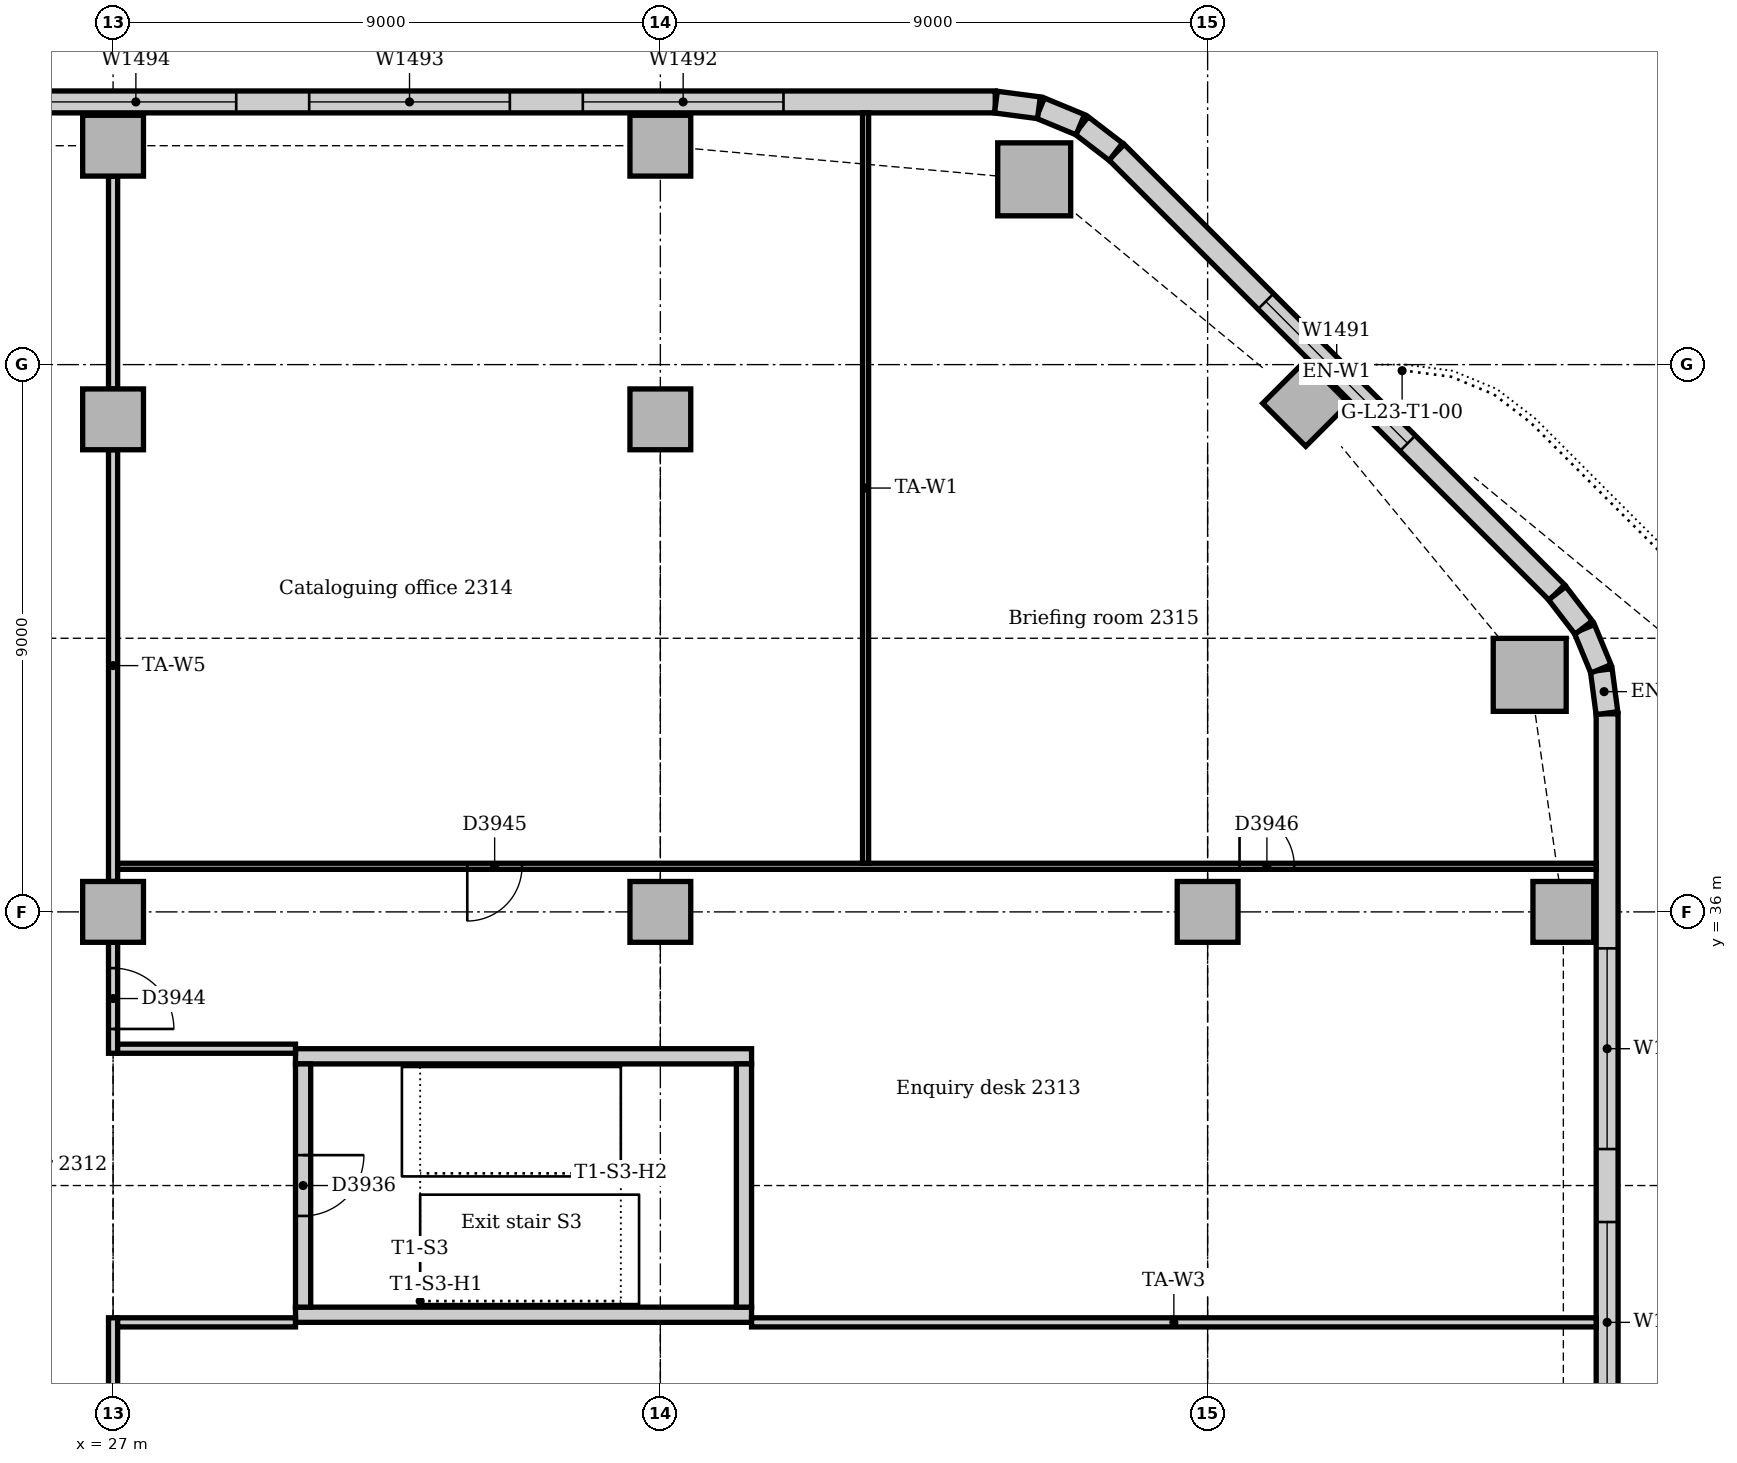
"""IFC4 building model, lengths in metres.
Left out: names, types, materials, properties, quantities, classifications, styles, units other than length and angle.
Written with IfcOpenShell. Run it as: python <this file> out.ifc"""

import sys

from ifc_helpers import new_model, si_unit, direction, frame, frame_2d, origin, origin_2d, place, context, subcontext, project, spatial, rectangle, extrude, element, fill, save


model = new_model("IFC4")
c1 = context("Model", 3, precision=1e-05, world=origin(), true_north=direction((0.0, 1.0)))
c2 = subcontext(c1, "Body", "Model", "MODEL_VIEW")
j1 = project(units=[si_unit("LENGTHUNIT", "METRE"), si_unit("PLANEANGLEUNIT", "RADIAN")], contexts=[c1])
p1 = place(None, origin())
s1 = spatial("IfcSite", under=j1, at=p1, CompositionType="ELEMENT")
p2 = place(p1, origin())
s2 = spatial("IfcBuilding", under=s1, at=p2, CompositionType="ELEMENT")
p3 = place(p2, frame((0.0, 0.0, 100.0)))
s3 = spatial("IfcBuildingStorey", under=s2, at=p3, CompositionType="ELEMENT", Elevation=100.0)
for number, where, z_axis, x_axis in (
    (1, (30.0, 29.375, 0.0), (0.0, 0.0, 1.0), (1.0, 0.0, 0.0)),
    (2, (37.5, 33.625, 0.0), (0.0, 0.0, 1.0), (-1.0, 0.0, 0.0)),
):
    element("IfcWall", number, at=place(p3, frame(where, z_axis=z_axis, x_axis=x_axis)), inside=s3, PredefinedType="SOLIDWALL", context=c2, shape_type="SweptSolid", body=[
        extrude(rectangle(XDim=7.5, YDim=0.25, at=frame_2d((3.75, 0.0))), origin(), (0.0, 0.0, 1.0), 4.0),
    ])
p4 = place(p3, frame((37.375, 29.5, 0.0), z_axis=(0.0, 0.0, 1.0), x_axis=(0.0, 1.0, 0.0)))
e3 = element("IfcWall", 3, at=p4, inside=s3, PredefinedType="SOLIDWALL", context=c2, shape_type="SweptSolid", body=[
    extrude(rectangle(XDim=4.0, YDim=0.25, at=frame_2d((2.0, 0.0))), origin(), (0.0, 0.0, 1.0), 4.0),
])
p5 = place(p3, frame((30.125, 33.5, 0.0), z_axis=(0.0, 0.0, 1.0), x_axis=(0.0, -1.0, 0.0)))
e4 = element("IfcWall", 4, at=p5, inside=s3, PredefinedType="SOLIDWALL", context=c2, shape_type="SweptSolid", body=[
    extrude(rectangle(XDim=4.0, YDim=0.25, at=frame_2d((2.0, 0.0))), origin(), (0.0, 0.0, 1.0), 4.0),
])
p6 = place(p5, frame((1.5, 0.0, 0.0)))
e5 = element("IfcOpeningElement", 5, at=p6, cuts=e4, PredefinedType="OPENING", context=c2, shape_type="SweptSolid", body=[
    extrude(rectangle(XDim=1.0, YDim=2.1, at=frame_2d((0.5, 1.05))), frame((0.0, 0.135, 0.0), z_axis=(0.0, -1.0, 0.0), x_axis=(1.0, 0.0, 0.0)), (0.0, 0.0, 1.0), 0.27),
])
for number, where, z_axis, x_axis in (
    (6, (50.297, 39.898, -0.15), (0.0, 0.0, 1.0), (1.0, 0.0, 0.0)),
    (7, (42.148, 48.047, -0.15), (0.0, 0.0, 1.0), (1.0, 0.0, 0.0)),
):
    element("IfcColumn", number, at=place(p3, frame(where, z_axis=z_axis, x_axis=x_axis)), inside=s3, PredefinedType="COLUMN", context=c2, shape_type="SweptSolid", body=[
        extrude(rectangle(XDim=1.2, YDim=1.2, at=origin_2d()), origin(), (0.0, 0.0, 1.0), 4.0),
    ])
for number, where, z_axis, x_axis in (
    (8, (50.85, 36.0, -0.15), (0.0, 0.0, 1.0), (1.0, 0.0, 0.0)),
    (9, (46.614, 44.364, -0.15), (0.0, 0.0, 1.0), (0.707, 0.707, 0.0)),
    (10, (27.0, 48.6, -0.15), (0.0, 0.0, 1.0), (1.0, 0.0, 0.0)),
    (11, (36.0, 48.6, -0.15), (0.0, 0.0, 1.0), (1.0, 0.0, 0.0)),
):
    element("IfcColumn", number, at=place(p3, frame(where, z_axis=z_axis, x_axis=x_axis)), inside=s3, PredefinedType="COLUMN", context=c2, shape_type="SweptSolid", body=[
        extrude(rectangle(XDim=1.0, YDim=1.0, at=origin_2d()), origin(), (0.0, 0.0, 1.0), 4.0),
    ])
for number, where, z_axis, x_axis in (
    (12, (27.0, 36.0, 0.0), (0.0, 0.0, 1.0), (1.0, 0.0, 0.0)),
    (13, (27.0, 44.1, 0.0), (0.0, 0.0, 1.0), (1.0, 0.0, 0.0)),
    (14, (36.0, 36.0, 0.0), (0.0, 0.0, 1.0), (1.0, 0.0, 0.0)),
    (15, (36.0, 44.1, 0.0), (0.0, 0.0, 1.0), (1.0, 0.0, 0.0)),
    (16, (45.0, 36.0, 0.0), (0.0, 0.0, 1.0), (1.0, 0.0, 0.0)),
):
    element("IfcColumn", number, at=place(p3, frame(where, z_axis=z_axis, x_axis=x_axis)), inside=s3, PredefinedType="COLUMN", context=c2, shape_type="SweptSolid", body=[
        extrude(rectangle(XDim=1.0, YDim=1.0, at=origin_2d()), origin(), (0.0, 0.0, 1.0), 3.85),
    ])
p7 = place(p3, frame((51.57, 14.743, 0.0), z_axis=(0.0, 0.0, 1.0), x_axis=(0.0, 1.0, 0.0)))
e17 = element("IfcWall", 17, at=p7, inside=s3, PredefinedType="STANDARD", context=c2, shape_type="SweptSolid", body=[
    extrude(rectangle(XDim=24.515, YDim=0.36, at=frame_2d((12.257, 0.0))), origin(), (0.0, 0.0, 1.0), 3.85),
])
p8 = place(p7, frame((4.157, 0.0, 0.0)))
e18 = element("IfcOpeningElement", 18, at=p8, cuts=e17, PredefinedType="OPENING", context=c2, shape_type="SweptSolid", body=[
    extrude(rectangle(XDim=1.8, YDim=2.4, at=frame_2d((0.9, 1.2))), frame((0.0, 0.19, 0.0), z_axis=(0.0, -1.0, 0.0), x_axis=(1.0, 0.0, 0.0)), (0.0, 0.0, 1.0), 0.38),
])
p9 = place(p7, frame((8.357, 0.0, 0.9)))
e19 = element("IfcOpeningElement", 19, at=p9, cuts=e17, PredefinedType="OPENING", context=c2, shape_type="SweptSolid", body=[
    extrude(rectangle(XDim=3.3, YDim=1.6, at=frame_2d((1.65, 0.8))), frame((0.0, 0.19, 0.0), z_axis=(0.0, -1.0, 0.0), x_axis=(1.0, 0.0, 0.0)), (0.0, 0.0, 1.0), 0.38),
])
p10 = place(p7, frame((12.857, 0.0, 0.9)))
e20 = element("IfcOpeningElement", 20, at=p10, cuts=e17, PredefinedType="OPENING", context=c2, shape_type="SweptSolid", body=[
    extrude(rectangle(XDim=3.3, YDim=1.6, at=frame_2d((1.65, 0.8))), frame((0.0, 0.19, 0.0), z_axis=(0.0, -1.0, 0.0), x_axis=(1.0, 0.0, 0.0)), (0.0, 0.0, 1.0), 0.38),
])
p11 = place(p7, frame((17.357, 0.0, 0.9)))
e21 = element("IfcOpeningElement", 21, at=p11, cuts=e17, PredefinedType="OPENING", context=c2, shape_type="SweptSolid", body=[
    extrude(rectangle(XDim=3.3, YDim=1.6, at=frame_2d((1.65, 0.8))), frame((0.0, 0.19, 0.0), z_axis=(0.0, -1.0, 0.0), x_axis=(1.0, 0.0, 0.0)), (0.0, 0.0, 1.0), 0.38),
])
p12 = place(p3, frame((50.744, 41.251, 0.0), z_axis=(0.0, 0.0, 1.0), x_axis=(-0.707106781187, 0.707106781187, 0.0)))
e22 = element("IfcWall", 22, at=p12, inside=s3, PredefinedType="STANDARD", context=c2, shape_type="SweptSolid", body=[
    extrude(rectangle(XDim=10.243, YDim=0.36, at=frame_2d((5.121, 0.0))), origin(), (0.0, 0.0, 1.0), 3.85),
])
p13 = place(p12, frame((3.471, 0.0, 0.9)))
e23 = element("IfcOpeningElement", 23, at=p13, cuts=e22, PredefinedType="OPENING", context=c2, shape_type="SweptSolid", body=[
    extrude(rectangle(XDim=3.3, YDim=1.6, at=frame_2d((1.65, 0.8))), frame((0.0, 0.19, 0.0), z_axis=(0.0, -1.0, 0.0), x_axis=(1.0, 0.0, 0.0)), (0.0, 0.0, 1.0), 0.38),
])
p14 = place(p3, frame((41.507, 49.32, 0.0), z_axis=(0.0, 0.0, 1.0), x_axis=(-1.0, 0.0, 0.0)))
e24 = element("IfcWall", 24, at=p14, inside=s3, PredefinedType="STANDARD", context=c2, shape_type="SweptSolid", body=[
    extrude(rectangle(XDim=37.265, YDim=0.36, at=frame_2d((18.632, 0.0))), origin(), (0.0, 0.0, 1.0), 3.85),
])
p15 = place(p14, frame((3.482, 0.0, 0.9)))
e25 = element("IfcOpeningElement", 25, at=p15, cuts=e24, PredefinedType="OPENING", context=c2, shape_type="SweptSolid", body=[
    extrude(rectangle(XDim=3.3, YDim=1.6, at=frame_2d((1.65, 0.8))), frame((0.0, 0.19, 0.0), z_axis=(0.0, -1.0, 0.0), x_axis=(1.0, 0.0, 0.0)), (0.0, 0.0, 1.0), 0.38),
])
p16 = place(p14, frame((7.982, 0.0, 0.9)))
e26 = element("IfcOpeningElement", 26, at=p16, cuts=e24, PredefinedType="OPENING", context=c2, shape_type="SweptSolid", body=[
    extrude(rectangle(XDim=3.3, YDim=1.6, at=frame_2d((1.65, 0.8))), frame((0.0, 0.19, 0.0), z_axis=(0.0, -1.0, 0.0), x_axis=(1.0, 0.0, 0.0)), (0.0, 0.0, 1.0), 0.38),
])
p17 = place(p14, frame((12.482, 0.0, 0.9)))
e27 = element("IfcOpeningElement", 27, at=p17, cuts=e24, PredefinedType="OPENING", context=c2, shape_type="SweptSolid", body=[
    extrude(rectangle(XDim=3.3, YDim=1.6, at=frame_2d((1.65, 0.8))), frame((0.0, 0.19, 0.0), z_axis=(0.0, -1.0, 0.0), x_axis=(1.0, 0.0, 0.0)), (0.0, 0.0, 1.0), 0.38),
])
p18 = place(p14, frame((17.032, 0.0, 0.9)))
e28 = element("IfcOpeningElement", 28, at=p18, cuts=e24, PredefinedType="OPENING", context=c2, shape_type="SweptSolid", body=[
    extrude(rectangle(XDim=1.8, YDim=1.6, at=frame_2d((0.9, 0.8))), frame((0.0, 0.19, 0.0), z_axis=(0.0, -1.0, 0.0), x_axis=(1.0, 0.0, 0.0)), (0.0, 0.0, 1.0), 0.38),
])
p19 = place(p14, frame((21.482, 0.0, 0.9)))
e29 = element("IfcOpeningElement", 29, at=p19, cuts=e24, PredefinedType="OPENING", context=c2, shape_type="SweptSolid", body=[
    extrude(rectangle(XDim=3.3, YDim=1.6, at=frame_2d((1.65, 0.8))), frame((0.0, 0.19, 0.0), z_axis=(0.0, -1.0, 0.0), x_axis=(1.0, 0.0, 0.0)), (0.0, 0.0, 1.0), 0.38),
])
p20 = place(p14, frame((25.982, 0.0, 0.9)))
e30 = element("IfcOpeningElement", 30, at=p20, cuts=e24, PredefinedType="OPENING", context=c2, shape_type="SweptSolid", body=[
    extrude(rectangle(XDim=3.3, YDim=1.6, at=frame_2d((1.65, 0.8))), frame((0.0, 0.19, 0.0), z_axis=(0.0, -1.0, 0.0), x_axis=(1.0, 0.0, 0.0)), (0.0, 0.0, 1.0), 0.38),
])
p21 = place(p14, frame((30.482, 0.0, 0.9)))
e31 = element("IfcOpeningElement", 31, at=p21, cuts=e24, PredefinedType="OPENING", context=c2, shape_type="SweptSolid", body=[
    extrude(rectangle(XDim=3.3, YDim=1.6, at=frame_2d((1.65, 0.8))), frame((0.0, 0.19, 0.0), z_axis=(0.0, -1.0, 0.0), x_axis=(1.0, 0.0, 0.0)), (0.0, 0.0, 1.0), 0.38),
])
for number, where, z_axis, x_axis in (
    (32, (51.567, 39.269, 0.0), (0.0, 0.0, 1.0), (-0.131, 0.991, 0.0)),
    (33, (51.468, 39.997, 0.0), (0.0, 0.0, 1.0), (-0.383, 0.924, 0.0)),
):
    element("IfcWall", number, at=place(p3, frame(where, z_axis=z_axis, x_axis=x_axis)), inside=s3, PredefinedType="STANDARD", context=c2, shape_type="SweptSolid", body=[
        extrude(rectangle(XDim=0.713, YDim=0.36, at=frame_2d((0.356, 0.0))), origin(), (0.0, 0.0, 1.0), 3.85),
    ])
for number, where, z_axis, x_axis in (
    (34, (51.184, 40.675, 0.0), (0.0, 0.0, 1.0), (-0.609, 0.793, 0.0)),
    (35, (43.491, 48.5, 0.0), (0.0, 0.0, 1.0), (-0.793, 0.609, 0.0)),
):
    element("IfcWall", number, at=place(p3, frame(where, z_axis=z_axis, x_axis=x_axis)), inside=s3, PredefinedType="STANDARD", context=c2, shape_type="SweptSolid", body=[
        extrude(rectangle(XDim=0.713, YDim=0.36, at=frame_2d((0.357, 0.0))), origin(), (0.0, 0.0, 1.0), 3.85),
    ])
for number, where, z_axis, x_axis in (
    (36, (42.906, 48.945, 0.0), (0.0, 0.0, 1.0), (-0.924, 0.383, 0.0)),
    (37, (42.226, 49.224, 0.0), (0.0, 0.0, 1.0), (-0.991, 0.131, 0.0)),
):
    element("IfcWall", number, at=place(p3, frame(where, z_axis=z_axis, x_axis=x_axis)), inside=s3, PredefinedType="STANDARD", context=c2, shape_type="SweptSolid", body=[
        extrude(rectangle(XDim=0.713, YDim=0.36, at=frame_2d((0.356, 0.0))), origin(), (0.0, 0.0, 1.0), 3.85),
    ])
p22 = place(p3, frame((27.0, 33.675, 0.0), z_axis=(0.0, 0.0, 1.0), x_axis=(0.0, 1.0, 0.0)))
e38 = element("IfcWall", 38, at=p22, inside=s3, PredefinedType="PARTITIONING", context=c2, shape_type="SweptSolid", body=[
    extrude(rectangle(XDim=1.825, YDim=0.15, at=frame_2d((0.912, 0.0))), origin(), (0.0, 0.0, 1.0), 3.256),
])
p23 = place(p22, frame((0.4, 0.0, 0.0)))
e39 = element("IfcOpeningElement", 39, at=p23, cuts=e38, PredefinedType="OPENING", context=c2, shape_type="SweptSolid", body=[
    extrude(rectangle(XDim=1.0, YDim=2.1, at=frame_2d((0.5, 1.05))), frame((0.0, 0.085, 0.0), z_axis=(0.0, -1.0, 0.0), x_axis=(1.0, 0.0, 0.0)), (0.0, 0.0, 1.0), 0.17),
])
p24 = place(p3, frame((27.0, 36.5, 0.0), z_axis=(0.0, 0.0, 1.0), x_axis=(0.0, 1.0, 0.0)))
e40 = element("IfcWall", 40, at=p24, inside=s3, PredefinedType="PARTITIONING", context=c2, shape_type="SweptSolid", body=[
    extrude(rectangle(XDim=7.1, YDim=0.15, at=frame_2d((3.55, 0.0))), origin(), (0.0, 0.0, 1.0), 3.256),
])
p25 = place(p3, frame((27.0, 44.6, 0.0), z_axis=(0.0, 0.0, 1.0), x_axis=(0.0, 1.0, 0.0)))
e41 = element("IfcWall", 41, at=p25, inside=s3, PredefinedType="PARTITIONING", context=c2, shape_type="SweptSolid", body=[
    extrude(rectangle(XDim=3.5, YDim=0.15, at=frame_2d((1.75, 0.0))), origin(), (0.0, 0.0, 1.0), 3.652),
])
p26 = place(p3, frame((27.0, 27.5, 0.0), z_axis=(0.0, 0.0, 1.0), x_axis=(0.0, 1.0, 0.0)))
e42 = element("IfcWall", 42, at=p26, inside=s3, PredefinedType="PARTITIONING", context=c2, shape_type="SweptSolid", body=[
    extrude(rectangle(XDim=1.825, YDim=0.15, at=frame_2d((0.912, 0.0))), origin(), (0.0, 0.0, 1.0), 3.256),
])
for number, where, z_axis, x_axis in (
    (43, (27.075, 29.25, 0.0), (0.0, 0.0, 1.0), (1.0, 0.0, 0.0)),
    (44, (27.075, 33.75, 0.0), (0.0, 0.0, 1.0), (1.0, 0.0, 0.0)),
):
    element("IfcWall", number, at=place(p3, frame(where, z_axis=z_axis, x_axis=x_axis)), inside=s3, PredefinedType="PARTITIONING", context=c2, shape_type="SweptSolid", body=[
        extrude(rectangle(XDim=2.925, YDim=0.15, at=frame_2d((1.462, 0.0))), origin(), (0.0, 0.0, 1.0), 3.85),
    ])
p27 = place(p3, frame((37.5, 29.25, 0.0), z_axis=(0.0, 0.0, 1.0), x_axis=(1.0, 0.0, 0.0)))
e45 = element("IfcWall", 45, at=p27, inside=s3, PredefinedType="PARTITIONING", context=c2, shape_type="SweptSolid", body=[
    extrude(rectangle(XDim=13.89, YDim=0.15, at=frame_2d((6.945, 0.0))), origin(), (0.0, 0.0, 1.0), 3.85),
])
p28 = place(p3, frame((27.075, 36.75, 0.0), z_axis=(0.0, 0.0, 1.0), x_axis=(1.0, 0.0, 0.0)))
e46 = element("IfcWall", 46, at=p28, inside=s3, PredefinedType="PARTITIONING", context=c2, shape_type="SweptSolid", body=[
    extrude(rectangle(XDim=24.315, YDim=0.1, at=frame_2d((12.158, 0.0))), origin(), (0.0, 0.0, 1.0), 3.85),
])
p29 = place(p28, frame((5.75, 0.0, 0.0)))
e47 = element("IfcOpeningElement", 47, at=p29, cuts=e46, PredefinedType="OPENING", context=c2, shape_type="SweptSolid", body=[
    extrude(rectangle(XDim=0.9, YDim=2.1, at=frame_2d((0.45, 1.05))), frame((0.0, 0.06, 0.0), z_axis=(0.0, -1.0, 0.0), x_axis=(1.0, 0.0, 0.0)), (0.0, 0.0, 1.0), 0.12),
])
p30 = place(p28, frame((18.45, 0.0, 0.0)))
e48 = element("IfcOpeningElement", 48, at=p30, cuts=e46, PredefinedType="OPENING", context=c2, shape_type="SweptSolid", body=[
    extrude(rectangle(XDim=0.9, YDim=2.1, at=frame_2d((0.45, 1.05))), frame((0.0, 0.06, 0.0), z_axis=(0.0, -1.0, 0.0), x_axis=(1.0, 0.0, 0.0)), (0.0, 0.0, 1.0), 0.12),
])
p31 = place(p3, frame((39.375, 36.8, 0.0), z_axis=(0.0, 0.0, 1.0), x_axis=(0.0, 1.0, 0.0)))
e49 = element("IfcWall", 49, at=p31, inside=s3, PredefinedType="PARTITIONING", context=c2, shape_type="SweptSolid", body=[
    extrude(rectangle(XDim=12.34, YDim=0.1, at=frame_2d((6.17, 0.0))), origin(), (0.0, 0.0, 1.0), 3.85),
])
p32 = place(p10, origin())
e50 = element("IfcWindow", 50, at=p32, inside=s3, PartitioningType="SINGLE_PANEL", PredefinedType="WINDOW", context=c2, shape_type="SweptSolid", body=[
    extrude(rectangle(XDim=3.3, YDim=1.6, at=frame_2d((1.65, 0.8))), frame((0.0, 0.13, 0.0), z_axis=(0.0, -1.0, 0.0), x_axis=(1.0, 0.0, 0.0)), (0.0, 0.0, 1.0), 0.06),
])
fill(e20, e50)
p33 = place(p11, origin())
e51 = element("IfcWindow", 51, at=p33, inside=s3, PartitioningType="SINGLE_PANEL", PredefinedType="WINDOW", context=c2, shape_type="SweptSolid", body=[
    extrude(rectangle(XDim=3.3, YDim=1.6, at=frame_2d((1.65, 0.8))), frame((0.0, 0.13, 0.0), z_axis=(0.0, -1.0, 0.0), x_axis=(1.0, 0.0, 0.0)), (0.0, 0.0, 1.0), 0.06),
])
fill(e21, e51)
p34 = place(p13, origin())
e52 = element("IfcWindow", 52, at=p34, inside=s3, PartitioningType="SINGLE_PANEL", PredefinedType="WINDOW", context=c2, shape_type="SweptSolid", body=[
    extrude(rectangle(XDim=3.3, YDim=1.6, at=frame_2d((1.65, 0.8))), frame((0.0, 0.13, 0.0), z_axis=(0.0, -1.0, 0.0), x_axis=(1.0, 0.0, 0.0)), (0.0, 0.0, 1.0), 0.06),
])
fill(e23, e52)
p35 = place(p15, origin())
e53 = element("IfcWindow", 53, at=p35, inside=s3, PartitioningType="SINGLE_PANEL", PredefinedType="WINDOW", context=c2, shape_type="SweptSolid", body=[
    extrude(rectangle(XDim=3.3, YDim=1.6, at=frame_2d((1.65, 0.8))), frame((0.0, 0.13, 0.0), z_axis=(0.0, -1.0, 0.0), x_axis=(1.0, 0.0, 0.0)), (0.0, 0.0, 1.0), 0.06),
])
fill(e25, e53)
p36 = place(p16, origin())
e54 = element("IfcWindow", 54, at=p36, inside=s3, PartitioningType="SINGLE_PANEL", PredefinedType="WINDOW", context=c2, shape_type="SweptSolid", body=[
    extrude(rectangle(XDim=3.3, YDim=1.6, at=frame_2d((1.65, 0.8))), frame((0.0, 0.13, 0.0), z_axis=(0.0, -1.0, 0.0), x_axis=(1.0, 0.0, 0.0)), (0.0, 0.0, 1.0), 0.06),
])
fill(e26, e54)
p37 = place(p17, origin())
e55 = element("IfcWindow", 55, at=p37, inside=s3, PartitioningType="SINGLE_PANEL", PredefinedType="WINDOW", context=c2, shape_type="SweptSolid", body=[
    extrude(rectangle(XDim=3.3, YDim=1.6, at=frame_2d((1.65, 0.8))), frame((0.0, 0.13, 0.0), z_axis=(0.0, -1.0, 0.0), x_axis=(1.0, 0.0, 0.0)), (0.0, 0.0, 1.0), 0.06),
])
fill(e27, e55)
p38 = place(p6, origin())
e56 = element("IfcDoor", 56, at=p38, inside=s3, OperationType="SINGLE_SWING_LEFT", PredefinedType="DOOR", context=c2, shape_type="SweptSolid", body=[
    extrude(rectangle(XDim=1.0, YDim=2.1, at=frame_2d((0.5, 1.05))), frame((0.0, 0.025, 0.0), z_axis=(0.0, -1.0, 0.0), x_axis=(1.0, 0.0, 0.0)), (0.0, 0.0, 1.0), 0.05),
])
fill(e5, e56)
p39 = place(p23, frame((1.0, 0.0, 0.0), z_axis=(0.0, 0.0, 1.0), x_axis=(-1.0, 0.0, 0.0)))
e57 = element("IfcDoor", 57, at=p39, inside=s3, OperationType="SINGLE_SWING_RIGHT", PredefinedType="DOOR", context=c2, shape_type="SweptSolid", body=[
    extrude(rectangle(XDim=1.0, YDim=2.1, at=frame_2d((0.5, 1.05))), frame((0.0, 0.025, 0.0), z_axis=(0.0, -1.0, 0.0), x_axis=(1.0, 0.0, 0.0)), (0.0, 0.0, 1.0), 0.05),
])
fill(e39, e57)
p40 = place(p29, frame((0.9, 0.0, 0.0), z_axis=(0.0, 0.0, 1.0), x_axis=(-1.0, 0.0, 0.0)))
e58 = element("IfcDoor", 58, at=p40, inside=s3, OperationType="SINGLE_SWING_RIGHT", PredefinedType="DOOR", context=c2, shape_type="SweptSolid", body=[
    extrude(rectangle(XDim=0.9, YDim=2.1, at=frame_2d((0.45, 1.05))), frame((0.0, 0.025, 0.0), z_axis=(0.0, -1.0, 0.0), x_axis=(1.0, 0.0, 0.0)), (0.0, 0.0, 1.0), 0.05),
])
fill(e47, e58)
p41 = place(p30, origin())
e59 = element("IfcDoor", 59, at=p41, inside=s3, OperationType="SINGLE_SWING_LEFT", PredefinedType="DOOR", context=c2, shape_type="SweptSolid", body=[
    extrude(rectangle(XDim=0.9, YDim=2.1, at=frame_2d((0.45, 1.05))), frame((0.0, 0.025, 0.0), z_axis=(0.0, -1.0, 0.0), x_axis=(1.0, 0.0, 0.0)), (0.0, 0.0, 1.0), 0.05),
])
fill(e48, e59)
save(model, sys.argv[1])
